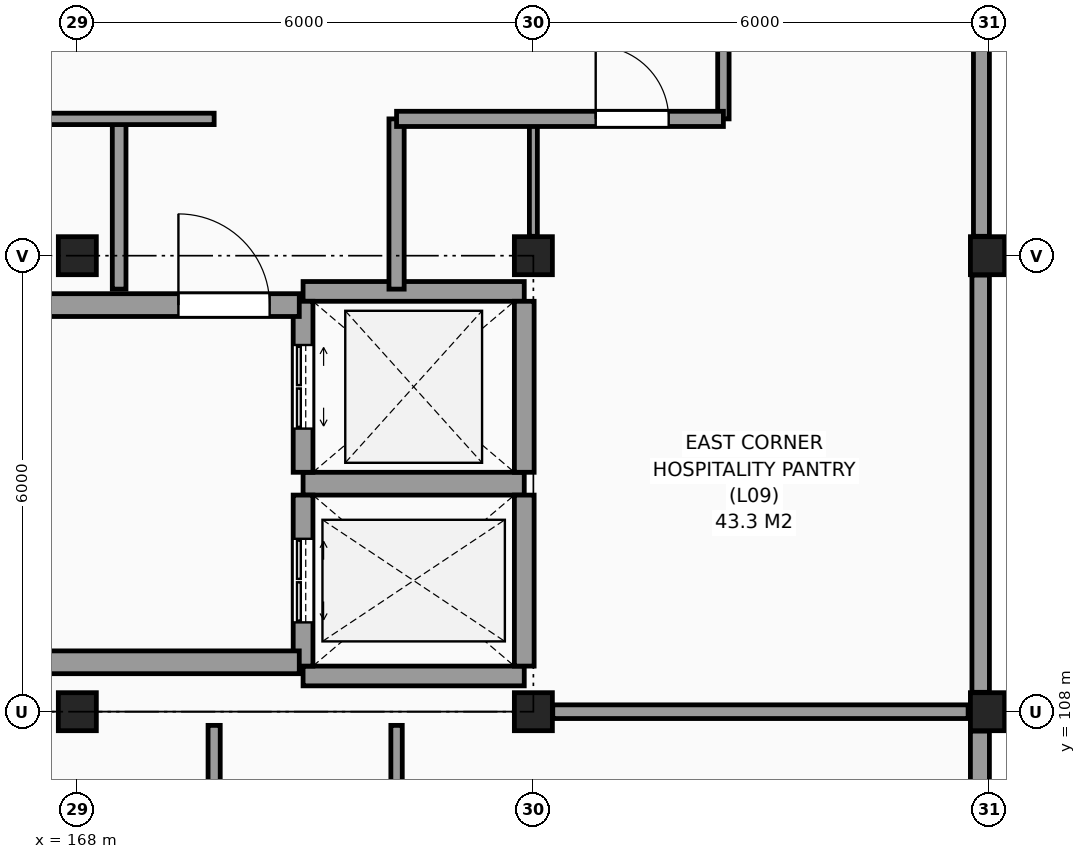
"""IFC4 building model, lengths in metres.
Left out: names, types, materials, properties, quantities, classifications, styles, units other than length and angle.
Written with IfcOpenShell. Run it as: python <this file> out.ifc"""

import sys

from ifc_helpers import new_model, si_unit, direction, frame, frame_2d, origin, origin_2d, place, context, subcontext, project, spatial, rectangle, extrude, element, fill, save


model = new_model("IFC4")
c1 = context("Model", 3, precision=1e-05, world=origin(), true_north=direction((0.0, 1.0)))
c2 = subcontext(c1, "Body", "Model", "MODEL_VIEW")
j1 = project(units=[si_unit("LENGTHUNIT", "METRE"), si_unit("PLANEANGLEUNIT", "RADIAN")], contexts=[c1])
p1 = place(None, origin())
s1 = spatial("IfcSite", under=j1, at=p1, CompositionType="ELEMENT")
p2 = place(p1, origin())
s2 = spatial("IfcBuilding", under=s1, at=p2, CompositionType="ELEMENT")
p3 = place(p2, frame((0.0, 0.0, 38.1)))
s3 = spatial("IfcBuildingStorey", under=s2, at=p3, CompositionType="ELEMENT", Elevation=38.1)
for number, where, z_axis, x_axis in (
    (1, (168.0, 108.0, 0.0), (0.0, 0.0, 1.0), (1.0, 0.0, 0.0)),
    (2, (168.0, 114.0, 0.0), (0.0, 0.0, 1.0), (1.0, 0.0, 0.0)),
    (3, (174.0, 108.0, 0.0), (0.0, 0.0, 1.0), (1.0, 0.0, 0.0)),
    (4, (174.0, 114.0, 0.0), (0.0, 0.0, 1.0), (1.0, 0.0, 0.0)),
    (5, (180.0, 108.0, 0.0), (0.0, 0.0, 1.0), (1.0, 0.0, 0.0)),
    (6, (180.0, 114.0, 0.0), (0.0, 0.0, 1.0), (1.0, 0.0, 0.0)),
):
    element("IfcColumn", number, at=place(p3, frame(where, z_axis=z_axis, x_axis=x_axis)), inside=s3, PredefinedType="COLUMN", context=c2, shape_type="SweptSolid", body=[
        extrude(rectangle(XDim=0.5, YDim=0.5, at=origin_2d()), origin(), (0.0, 0.0, 1.0), 3.3),
    ])
p4 = place(p3, frame((179.875, 102.255, 0.0), z_axis=(0.0, 0.0, 1.0), x_axis=(0.0, 1.0, 0.0)))
e7 = element("IfcWall", 7, at=p4, inside=s3, PredefinedType="SOLIDWALL", context=c2, shape_type="SweptSolid", body=[
    extrude(rectangle(XDim=5.49, YDim=0.25, at=frame_2d((2.745, 0.0))), origin(), (0.0, 0.0, 1.0), 2.41),
])
p5 = place(p4, frame((2.045, 0.0, 0.8)))
e8 = element("IfcOpeningElement", 8, at=p5, cuts=e7, PredefinedType="OPENING", context=c2, shape_type="SweptSolid", body=[
    extrude(rectangle(XDim=1.4, YDim=1.4, at=frame_2d((0.7, 0.7))), frame((0.0, 0.135, 0.0), z_axis=(0.0, -1.0, 0.0), x_axis=(1.0, 0.0, 0.0)), (0.0, 0.0, 1.0), 0.27),
])
p6 = place(p3, frame((179.885, 108.255, 0.0), z_axis=(0.0, 0.0, 1.0), x_axis=(0.0, 1.0, 0.0)))
e9 = element("IfcWall", 9, at=p6, inside=s3, PredefinedType="SOLIDWALL", context=c2, shape_type="SweptSolid", body=[
    extrude(rectangle(XDim=5.49, YDim=0.23, at=frame_2d((2.745, 0.0))), origin(), (0.0, 0.0, 1.0), 2.41),
])
p7 = place(p3, frame((179.895, 114.255, 0.0), z_axis=(0.0, 0.0, 1.0), x_axis=(0.0, 1.0, 0.0)))
e10 = element("IfcWall", 10, at=p7, inside=s3, PredefinedType="SOLIDWALL", context=c2, shape_type="SweptSolid", body=[
    extrude(rectangle(XDim=5.49, YDim=0.21, at=frame_2d((2.745, 0.0))), origin(), (0.0, 0.0, 1.0), 2.41),
])
p8 = place(p3, frame((170.97, 108.47, 0.0), z_axis=(0.0, 0.0, 1.0), x_axis=(1.0, 0.0, 0.0)))
e11 = element("IfcWall", 11, at=p8, inside=s3, PredefinedType="SHEAR", context=c2, shape_type="SweptSolid", body=[
    extrude(rectangle(XDim=2.91, YDim=0.26, at=frame_2d((1.455, 0.0))), origin(), (0.0, 0.0, 1.0), 3.3),
])
p9 = place(p3, frame((170.97, 111.0, 0.0), z_axis=(0.0, 0.0, 1.0), x_axis=(1.0, 0.0, 0.0)))
e12 = element("IfcWall", 12, at=p9, inside=s3, PredefinedType="SHEAR", context=c2, shape_type="SweptSolid", body=[
    extrude(rectangle(XDim=2.91, YDim=0.3, at=frame_2d((1.455, 0.0))), origin(), (0.0, 0.0, 1.0), 3.3),
])
p10 = place(p3, frame((173.88, 108.6, 0.0), z_axis=(0.0, 0.0, 1.0), x_axis=(0.0, 1.0, 0.0)))
e13 = element("IfcWall", 13, at=p10, inside=s3, PredefinedType="SHEAR", context=c2, shape_type="SweptSolid", body=[
    extrude(rectangle(XDim=2.25, YDim=0.26, at=frame_2d((1.125, 0.0))), origin(), (0.0, 0.0, 1.0), 3.3),
])
p11 = place(p3, frame((170.97, 108.6, 0.0), z_axis=(0.0, 0.0, 1.0), x_axis=(0.0, 1.0, 0.0)))
e14 = element("IfcWall", 14, at=p11, inside=s3, PredefinedType="SHEAR", context=c2, shape_type="SweptSolid", body=[
    extrude(rectangle(XDim=2.25, YDim=0.26, at=frame_2d((1.125, 0.0))), origin(), (0.0, 0.0, 1.0), 3.3),
])
p12 = place(p11, frame((0.575, 0.0, 0.0)))
e15 = element("IfcOpeningElement", 15, at=p12, cuts=e14, PredefinedType="OPENING", context=c2, shape_type="SweptSolid", body=[
    extrude(rectangle(XDim=1.1, YDim=2.2, at=frame_2d((0.55, 1.1))), frame((0.0, 0.14, 0.0), z_axis=(0.0, -1.0, 0.0), x_axis=(1.0, 0.0, 0.0)), (0.0, 0.0, 1.0), 0.28),
])
p13 = place(p3, frame((170.97, 113.53, 0.0), z_axis=(0.0, 0.0, 1.0), x_axis=(1.0, 0.0, 0.0)))
e16 = element("IfcWall", 16, at=p13, inside=s3, PredefinedType="SHEAR", context=c2, shape_type="SweptSolid", body=[
    extrude(rectangle(XDim=2.91, YDim=0.26, at=frame_2d((1.455, 0.0))), origin(), (0.0, 0.0, 1.0), 3.3),
])
p14 = place(p3, frame((173.88, 111.15, 0.0), z_axis=(0.0, 0.0, 1.0), x_axis=(0.0, 1.0, 0.0)))
e17 = element("IfcWall", 17, at=p14, inside=s3, PredefinedType="SHEAR", context=c2, shape_type="SweptSolid", body=[
    extrude(rectangle(XDim=2.25, YDim=0.26, at=frame_2d((1.125, 0.0))), origin(), (0.0, 0.0, 1.0), 3.3),
])
p15 = place(p3, frame((170.97, 111.15, 0.0), z_axis=(0.0, 0.0, 1.0), x_axis=(0.0, 1.0, 0.0)))
e18 = element("IfcWall", 18, at=p15, inside=s3, PredefinedType="SHEAR", context=c2, shape_type="SweptSolid", body=[
    extrude(rectangle(XDim=2.25, YDim=0.26, at=frame_2d((1.125, 0.0))), origin(), (0.0, 0.0, 1.0), 3.3),
])
p16 = place(p15, frame((0.575, 0.0, 0.0)))
e19 = element("IfcOpeningElement", 19, at=p16, cuts=e18, PredefinedType="OPENING", context=c2, shape_type="SweptSolid", body=[
    extrude(rectangle(XDim=1.1, YDim=2.2, at=frame_2d((0.55, 1.1))), frame((0.0, 0.14, 0.0), z_axis=(0.0, -1.0, 0.0), x_axis=(1.0, 0.0, 0.0)), (0.0, 0.0, 1.0), 0.28),
])
p17 = place(p3, frame((166.68, 113.35, 0.0), z_axis=(0.0, 0.0, 1.0), x_axis=(1.0, 0.0, 0.0)))
e20 = element("IfcWall", 20, at=p17, inside=s3, PredefinedType="SHEAR", context=c2, shape_type="SweptSolid", body=[
    extrude(rectangle(XDim=4.24, YDim=0.3, at=frame_2d((2.12, 0.0))), origin(), (0.0, 0.0, 1.0), 3.3),
])
p18 = place(p17, frame((2.65, 0.0, 0.0)))
e21 = element("IfcOpeningElement", 21, at=p18, cuts=e20, PredefinedType="OPENING", context=c2, shape_type="SweptSolid", body=[
    extrude(rectangle(XDim=1.2, YDim=2.2, at=frame_2d((0.6, 1.1))), frame((0.0, 0.16, 0.0), z_axis=(0.0, -1.0, 0.0), x_axis=(1.0, 0.0, 0.0)), (0.0, 0.0, 1.0), 0.32),
])
p19 = place(p3, frame((166.68, 108.65, 0.0), z_axis=(0.0, 0.0, 1.0), x_axis=(1.0, 0.0, 0.0)))
e22 = element("IfcWall", 22, at=p19, inside=s3, PredefinedType="SHEAR", context=c2, shape_type="SweptSolid", body=[
    extrude(rectangle(XDim=4.24, YDim=0.3, at=frame_2d((2.12, 0.0))), origin(), (0.0, 0.0, 1.0), 3.3),
])
p20 = place(p3, frame((168.55, 113.56, 0.0), z_axis=(0.0, 0.0, 1.0), x_axis=(0.0, 1.0, 0.0)))
e23 = element("IfcWall", 23, at=p20, inside=s3, PredefinedType="PARTITIONING", context=c2, shape_type="SweptSolid", body=[
    extrude(rectangle(XDim=2.24, YDim=0.18, at=frame_2d((1.12, 0.0))), origin(), (0.0, 0.0, 1.0), 3.06),
])
p21 = place(p3, frame((169.8, 42.215, 0.0), z_axis=(0.0, 0.0, 1.0), x_axis=(0.0, 1.0, 0.0)))
e24 = element("IfcWall", 24, at=p21, inside=s3, PredefinedType="PARTITIONING", context=c2, shape_type="SweptSolid", body=[
    extrude(rectangle(XDim=65.605, YDim=0.16, at=frame_2d((32.802, 0.0))), origin(), (0.0, 0.0, 1.0), 3.06),
])
p22 = place(p21, frame((50.185, 0.0, 0.0)))
e25 = element("IfcOpeningElement", 25, at=p22, cuts=e24, PredefinedType="OPENING", context=c2, shape_type="SweptSolid", body=[
    extrude(rectangle(XDim=1.2, YDim=2.2, at=frame_2d((0.6, 1.1))), frame((0.0, 0.09, 0.0), z_axis=(0.0, -1.0, 0.0), x_axis=(1.0, 0.0, 0.0)), (0.0, 0.0, 1.0), 0.18),
])
p23 = place(p21, frame((32.285, 0.0, 0.0)))
e26 = element("IfcOpeningElement", 26, at=p23, cuts=e24, PredefinedType="OPENING", context=c2, shape_type="SweptSolid", body=[
    extrude(rectangle(XDim=1.0, YDim=2.15, at=frame_2d((0.5, 1.075))), frame((0.0, 0.09, 0.0), z_axis=(0.0, -1.0, 0.0), x_axis=(1.0, 0.0, 0.0)), (0.0, 0.0, 1.0), 0.18),
])
p24 = place(p21, frame((0.46, 0.0, 0.0)))
e27 = element("IfcOpeningElement", 27, at=p24, cuts=e24, PredefinedType="OPENING", context=c2, shape_type="SweptSolid", body=[
    extrude(rectangle(XDim=0.95, YDim=2.1, at=frame_2d((0.475, 1.05))), frame((0.0, 0.09, 0.0), z_axis=(0.0, -1.0, 0.0), x_axis=(1.0, 0.0, 0.0)), (0.0, 0.0, 1.0), 0.18),
])
p25 = place(p21, frame((6.51, 0.0, 0.0)))
e28 = element("IfcOpeningElement", 28, at=p25, cuts=e24, PredefinedType="OPENING", context=c2, shape_type="SweptSolid", body=[
    extrude(rectangle(XDim=0.95, YDim=2.1, at=frame_2d((0.475, 1.05))), frame((0.0, 0.09, 0.0), z_axis=(0.0, -1.0, 0.0), x_axis=(1.0, 0.0, 0.0)), (0.0, 0.0, 1.0), 0.18),
])
p26 = place(p21, frame((12.51, 0.0, 0.0)))
e29 = element("IfcOpeningElement", 29, at=p26, cuts=e24, PredefinedType="OPENING", context=c2, shape_type="SweptSolid", body=[
    extrude(rectangle(XDim=0.95, YDim=2.1, at=frame_2d((0.475, 1.05))), frame((0.0, 0.09, 0.0), z_axis=(0.0, -1.0, 0.0), x_axis=(1.0, 0.0, 0.0)), (0.0, 0.0, 1.0), 0.18),
])
p27 = place(p21, frame((18.51, 0.0, 0.0)))
e30 = element("IfcOpeningElement", 30, at=p27, cuts=e24, PredefinedType="OPENING", context=c2, shape_type="SweptSolid", body=[
    extrude(rectangle(XDim=0.95, YDim=2.1, at=frame_2d((0.475, 1.05))), frame((0.0, 0.09, 0.0), z_axis=(0.0, -1.0, 0.0), x_axis=(1.0, 0.0, 0.0)), (0.0, 0.0, 1.0), 0.18),
])
p28 = place(p21, frame((24.51, 0.0, 0.0)))
e31 = element("IfcOpeningElement", 31, at=p28, cuts=e24, PredefinedType="OPENING", context=c2, shape_type="SweptSolid", body=[
    extrude(rectangle(XDim=0.95, YDim=2.1, at=frame_2d((0.475, 1.05))), frame((0.0, 0.09, 0.0), z_axis=(0.0, -1.0, 0.0), x_axis=(1.0, 0.0, 0.0)), (0.0, 0.0, 1.0), 0.18),
])
p29 = place(p21, frame((54.51, 0.0, 0.0)))
e32 = element("IfcOpeningElement", 32, at=p29, cuts=e24, PredefinedType="OPENING", context=c2, shape_type="SweptSolid", body=[
    extrude(rectangle(XDim=0.95, YDim=2.1, at=frame_2d((0.475, 1.05))), frame((0.0, 0.09, 0.0), z_axis=(0.0, -1.0, 0.0), x_axis=(1.0, 0.0, 0.0)), (0.0, 0.0, 1.0), 0.18),
])
p30 = place(p21, frame((60.51, 0.0, 0.0)))
e33 = element("IfcOpeningElement", 33, at=p30, cuts=e24, PredefinedType="OPENING", context=c2, shape_type="SweptSolid", body=[
    extrude(rectangle(XDim=0.95, YDim=2.1, at=frame_2d((0.475, 1.05))), frame((0.0, 0.09, 0.0), z_axis=(0.0, -1.0, 0.0), x_axis=(1.0, 0.0, 0.0)), (0.0, 0.0, 1.0), 0.18),
])
p31 = place(p3, frame((172.2, 42.215, 0.0), z_axis=(0.0, 0.0, 1.0), x_axis=(0.0, 1.0, 0.0)))
e34 = element("IfcWall", 34, at=p31, inside=s3, PredefinedType="PARTITIONING", context=c2, shape_type="SweptSolid", body=[
    extrude(rectangle(XDim=65.605, YDim=0.15, at=frame_2d((32.802, 0.0))), origin(), (0.0, 0.0, 1.0), 3.06),
])
p32 = place(p31, frame((0.46, 0.0, 0.0)))
e35 = element("IfcOpeningElement", 35, at=p32, cuts=e34, PredefinedType="OPENING", context=c2, shape_type="SweptSolid", body=[
    extrude(rectangle(XDim=0.95, YDim=2.1, at=frame_2d((0.475, 1.05))), frame((0.0, 0.085, 0.0), z_axis=(0.0, -1.0, 0.0), x_axis=(1.0, 0.0, 0.0)), (0.0, 0.0, 1.0), 0.17),
])
p33 = place(p31, frame((4.91, 0.0, 0.0)))
e36 = element("IfcOpeningElement", 36, at=p33, cuts=e34, PredefinedType="OPENING", context=c2, shape_type="SweptSolid", body=[
    extrude(rectangle(XDim=0.95, YDim=2.1, at=frame_2d((0.475, 1.05))), frame((0.0, 0.085, 0.0), z_axis=(0.0, -1.0, 0.0), x_axis=(1.0, 0.0, 0.0)), (0.0, 0.0, 1.0), 0.17),
])
p34 = place(p31, frame((12.11, 0.0, 0.0)))
e37 = element("IfcOpeningElement", 37, at=p34, cuts=e34, PredefinedType="OPENING", context=c2, shape_type="SweptSolid", body=[
    extrude(rectangle(XDim=0.95, YDim=2.1, at=frame_2d((0.475, 1.05))), frame((0.0, 0.085, 0.0), z_axis=(0.0, -1.0, 0.0), x_axis=(1.0, 0.0, 0.0)), (0.0, 0.0, 1.0), 0.17),
])
p35 = place(p31, frame((20.36, 0.0, 0.0)))
e38 = element("IfcOpeningElement", 38, at=p35, cuts=e34, PredefinedType="OPENING", context=c2, shape_type="SweptSolid", body=[
    extrude(rectangle(XDim=0.95, YDim=2.1, at=frame_2d((0.475, 1.05))), frame((0.0, 0.085, 0.0), z_axis=(0.0, -1.0, 0.0), x_axis=(1.0, 0.0, 0.0)), (0.0, 0.0, 1.0), 0.17),
])
p36 = place(p31, frame((22.91, 0.0, 0.0)))
e39 = element("IfcOpeningElement", 39, at=p36, cuts=e34, PredefinedType="OPENING", context=c2, shape_type="SweptSolid", body=[
    extrude(rectangle(XDim=0.95, YDim=2.1, at=frame_2d((0.475, 1.05))), frame((0.0, 0.085, 0.0), z_axis=(0.0, -1.0, 0.0), x_axis=(1.0, 0.0, 0.0)), (0.0, 0.0, 1.0), 0.17),
])
p37 = place(p31, frame((30.11, 0.0, 0.0)))
e40 = element("IfcOpeningElement", 40, at=p37, cuts=e34, PredefinedType="OPENING", context=c2, shape_type="SweptSolid", body=[
    extrude(rectangle(XDim=0.95, YDim=2.1, at=frame_2d((0.475, 1.05))), frame((0.0, 0.085, 0.0), z_axis=(0.0, -1.0, 0.0), x_axis=(1.0, 0.0, 0.0)), (0.0, 0.0, 1.0), 0.17),
])
p38 = place(p31, frame((34.31, 0.0, 0.0)))
e41 = element("IfcOpeningElement", 41, at=p38, cuts=e34, PredefinedType="OPENING", context=c2, shape_type="SweptSolid", body=[
    extrude(rectangle(XDim=0.95, YDim=2.1, at=frame_2d((0.475, 1.05))), frame((0.0, 0.085, 0.0), z_axis=(0.0, -1.0, 0.0), x_axis=(1.0, 0.0, 0.0)), (0.0, 0.0, 1.0), 0.17),
])
p39 = place(p31, frame((43.61, 0.0, 0.0)))
e42 = element("IfcOpeningElement", 42, at=p39, cuts=e34, PredefinedType="OPENING", context=c2, shape_type="SweptSolid", body=[
    extrude(rectangle(XDim=0.95, YDim=2.1, at=frame_2d((0.475, 1.05))), frame((0.0, 0.085, 0.0), z_axis=(0.0, -1.0, 0.0), x_axis=(1.0, 0.0, 0.0)), (0.0, 0.0, 1.0), 0.17),
])
p40 = place(p31, frame((48.11, 0.0, 0.0)))
e43 = element("IfcOpeningElement", 43, at=p40, cuts=e34, PredefinedType="OPENING", context=c2, shape_type="SweptSolid", body=[
    extrude(rectangle(XDim=0.95, YDim=2.1, at=frame_2d((0.475, 1.05))), frame((0.0, 0.085, 0.0), z_axis=(0.0, -1.0, 0.0), x_axis=(1.0, 0.0, 0.0)), (0.0, 0.0, 1.0), 0.17),
])
p41 = place(p31, frame((52.31, 0.0, 0.0)))
e44 = element("IfcOpeningElement", 44, at=p41, cuts=e34, PredefinedType="OPENING", context=c2, shape_type="SweptSolid", body=[
    extrude(rectangle(XDim=0.95, YDim=2.1, at=frame_2d((0.475, 1.05))), frame((0.0, 0.085, 0.0), z_axis=(0.0, -1.0, 0.0), x_axis=(1.0, 0.0, 0.0)), (0.0, 0.0, 1.0), 0.17),
])
p42 = place(p31, frame((54.51, 0.0, 0.0)))
e45 = element("IfcOpeningElement", 45, at=p42, cuts=e34, PredefinedType="OPENING", context=c2, shape_type="SweptSolid", body=[
    extrude(rectangle(XDim=0.95, YDim=2.1, at=frame_2d((0.475, 1.05))), frame((0.0, 0.085, 0.0), z_axis=(0.0, -1.0, 0.0), x_axis=(1.0, 0.0, 0.0)), (0.0, 0.0, 1.0), 0.17),
])
p43 = place(p31, frame((60.51, 0.0, 0.0)))
e46 = element("IfcOpeningElement", 46, at=p43, cuts=e34, PredefinedType="OPENING", context=c2, shape_type="SweptSolid", body=[
    extrude(rectangle(XDim=0.95, YDim=2.1, at=frame_2d((0.475, 1.05))), frame((0.0, 0.085, 0.0), z_axis=(0.0, -1.0, 0.0), x_axis=(1.0, 0.0, 0.0)), (0.0, 0.0, 1.0), 0.17),
])
p44 = place(p3, frame((172.2, 113.56, 0.0), z_axis=(0.0, 0.0, 1.0), x_axis=(0.0, 1.0, 0.0)))
e47 = element("IfcWall", 47, at=p44, inside=s3, PredefinedType="PARTITIONING", context=c2, shape_type="SweptSolid", body=[
    extrude(rectangle(XDim=2.24, YDim=0.2, at=frame_2d((1.12, 0.0))), origin(), (0.0, 0.0, 1.0), 3.06),
])
p45 = place(p3, frame((174.0, 114.255, 0.0), z_axis=(0.0, 0.0, 1.0), x_axis=(0.0, 1.0, 0.0)))
e48 = element("IfcWall", 48, at=p45, inside=s3, PredefinedType="PARTITIONING", context=c2, shape_type="SweptSolid", body=[
    extrude(rectangle(XDim=1.545, YDim=0.105, at=frame_2d((0.772, 0.0))), origin(), (0.0, 0.0, 1.0), 2.72),
])
p46 = place(p3, frame((176.5, 115.8, 0.0), z_axis=(0.0, 0.0, 1.0), x_axis=(0.0, 1.0, 0.0)))
e49 = element("IfcWall", 49, at=p46, inside=s3, PredefinedType="PARTITIONING", context=c2, shape_type="SweptSolid", body=[
    extrude(rectangle(XDim=2.4, YDim=0.15, at=frame_2d((1.2, 0.0))), origin(), (0.0, 0.0, 1.0), 3.06),
])
p47 = place(p3, frame((174.255, 108.0, 0.0), z_axis=(0.0, 0.0, 1.0), x_axis=(1.0, 0.0, 0.0)))
e50 = element("IfcWall", 50, at=p47, inside=s3, PredefinedType="PARTITIONING", context=c2, shape_type="SweptSolid", body=[
    extrude(rectangle(XDim=5.465, YDim=0.18, at=frame_2d((2.732, 0.0))), origin(), (0.0, 0.0, 1.0), 2.77),
])
p48 = place(p3, frame((102.215, 115.8, 0.0), z_axis=(0.0, 0.0, 1.0), x_axis=(1.0, 0.0, 0.0)))
e51 = element("IfcWall", 51, at=p48, inside=s3, PredefinedType="PARTITIONING", context=c2, shape_type="SweptSolid", body=[
    extrude(rectangle(XDim=67.585, YDim=0.15, at=frame_2d((33.792, 0.0))), origin(), (0.0, 0.0, 1.0), 3.06),
])
p49 = place(p48, frame((44.185, 0.0, 0.0)))
e52 = element("IfcOpeningElement", 52, at=p49, cuts=e51, PredefinedType="OPENING", context=c2, shape_type="SweptSolid", body=[
    extrude(rectangle(XDim=1.2, YDim=2.2, at=frame_2d((0.6, 1.1))), frame((0.0, 0.085, 0.0), z_axis=(0.0, -1.0, 0.0), x_axis=(1.0, 0.0, 0.0)), (0.0, 0.0, 1.0), 0.17),
])
p50 = place(p48, frame((14.185, 0.0, 0.0)))
e53 = element("IfcOpeningElement", 53, at=p50, cuts=e51, PredefinedType="OPENING", context=c2, shape_type="SweptSolid", body=[
    extrude(rectangle(XDim=1.2, YDim=2.2, at=frame_2d((0.6, 1.1))), frame((0.0, 0.085, 0.0), z_axis=(0.0, -1.0, 0.0), x_axis=(1.0, 0.0, 0.0)), (0.0, 0.0, 1.0), 0.17),
])
p51 = place(p48, frame((19.335, 0.0, 0.0)))
e54 = element("IfcOpeningElement", 54, at=p51, cuts=e51, PredefinedType="OPENING", context=c2, shape_type="SweptSolid", body=[
    extrude(rectangle(XDim=1.0, YDim=2.15, at=frame_2d((0.5, 1.075))), frame((0.0, 0.085, 0.0), z_axis=(0.0, -1.0, 0.0), x_axis=(1.0, 0.0, 0.0)), (0.0, 0.0, 1.0), 0.17),
])
p52 = place(p48, frame((26.305, 0.0, 0.0)))
e55 = element("IfcOpeningElement", 55, at=p52, cuts=e51, PredefinedType="OPENING", context=c2, shape_type="SweptSolid", body=[
    extrude(rectangle(XDim=0.96, YDim=2.15, at=frame_2d((0.48, 1.075))), frame((0.0, 0.085, 0.0), z_axis=(0.0, -1.0, 0.0), x_axis=(1.0, 0.0, 0.0)), (0.0, 0.0, 1.0), 0.17),
])
p53 = place(p48, frame((48.51, 0.0, 0.0)))
e56 = element("IfcOpeningElement", 56, at=p53, cuts=e51, PredefinedType="OPENING", context=c2, shape_type="SweptSolid", body=[
    extrude(rectangle(XDim=0.95, YDim=2.1, at=frame_2d((0.475, 1.05))), frame((0.0, 0.085, 0.0), z_axis=(0.0, -1.0, 0.0), x_axis=(1.0, 0.0, 0.0)), (0.0, 0.0, 1.0), 0.17),
])
p54 = place(p3, frame((172.2, 115.8, 0.0), z_axis=(0.0, 0.0, 1.0), x_axis=(1.0, 0.0, 0.0)))
e57 = element("IfcWall", 57, at=p54, inside=s3, PredefinedType="PARTITIONING", context=c2, shape_type="SweptSolid", body=[
    extrude(rectangle(XDim=4.3, YDim=0.2, at=frame_2d((2.15, 0.0))), origin(), (0.0, 0.0, 1.0), 3.06),
])
p55 = place(p54, frame((2.62, 0.0, 0.0)))
e58 = element("IfcOpeningElement", 58, at=p55, cuts=e57, PredefinedType="OPENING", context=c2, shape_type="SweptSolid", body=[
    extrude(rectangle(XDim=0.96, YDim=2.15, at=frame_2d((0.48, 1.075))), frame((0.0, 0.11, 0.0), z_axis=(0.0, -1.0, 0.0), x_axis=(1.0, 0.0, 0.0)), (0.0, 0.0, 1.0), 0.22),
])
p56 = place(p12, origin())
e59 = element("IfcDoor", 59, at=p56, inside=s3, OperationType="DOUBLE_DOOR_SLIDING", PredefinedType="DOOR", context=c2, shape_type="SweptSolid", body=[
    extrude(rectangle(XDim=1.1, YDim=2.2, at=frame_2d((0.55, 1.1))), frame((0.0, 0.025, 0.0), z_axis=(0.0, -1.0, 0.0), x_axis=(1.0, 0.0, 0.0)), (0.0, 0.0, 1.0), 0.05),
])
fill(e15, e59)
p57 = place(p16, origin())
e60 = element("IfcDoor", 60, at=p57, inside=s3, OperationType="DOUBLE_DOOR_SLIDING", PredefinedType="DOOR", context=c2, shape_type="SweptSolid", body=[
    extrude(rectangle(XDim=1.1, YDim=2.2, at=frame_2d((0.55, 1.1))), frame((0.0, 0.025, 0.0), z_axis=(0.0, -1.0, 0.0), x_axis=(1.0, 0.0, 0.0)), (0.0, 0.0, 1.0), 0.05),
])
fill(e19, e60)
p58 = place(p18, origin())
e61 = element("IfcDoor", 61, at=p58, inside=s3, OperationType="SINGLE_SWING_LEFT", PredefinedType="DOOR", context=c2, shape_type="SweptSolid", body=[
    extrude(rectangle(XDim=1.2, YDim=2.2, at=frame_2d((0.6, 1.1))), frame((0.0, 0.025, 0.0), z_axis=(0.0, -1.0, 0.0), x_axis=(1.0, 0.0, 0.0)), (0.0, 0.0, 1.0), 0.05),
])
fill(e21, e61)
p59 = place(p55, origin())
e62 = element("IfcDoor", 62, at=p59, inside=s3, OperationType="SINGLE_SWING_LEFT", PredefinedType="DOOR", context=c2, shape_type="SweptSolid", body=[
    extrude(rectangle(XDim=0.96, YDim=2.15, at=frame_2d((0.48, 1.075))), frame((0.0, 0.025, 0.0), z_axis=(0.0, -1.0, 0.0), x_axis=(1.0, 0.0, 0.0)), (0.0, 0.0, 1.0), 0.05),
])
fill(e58, e62)
save(model, sys.argv[1])
